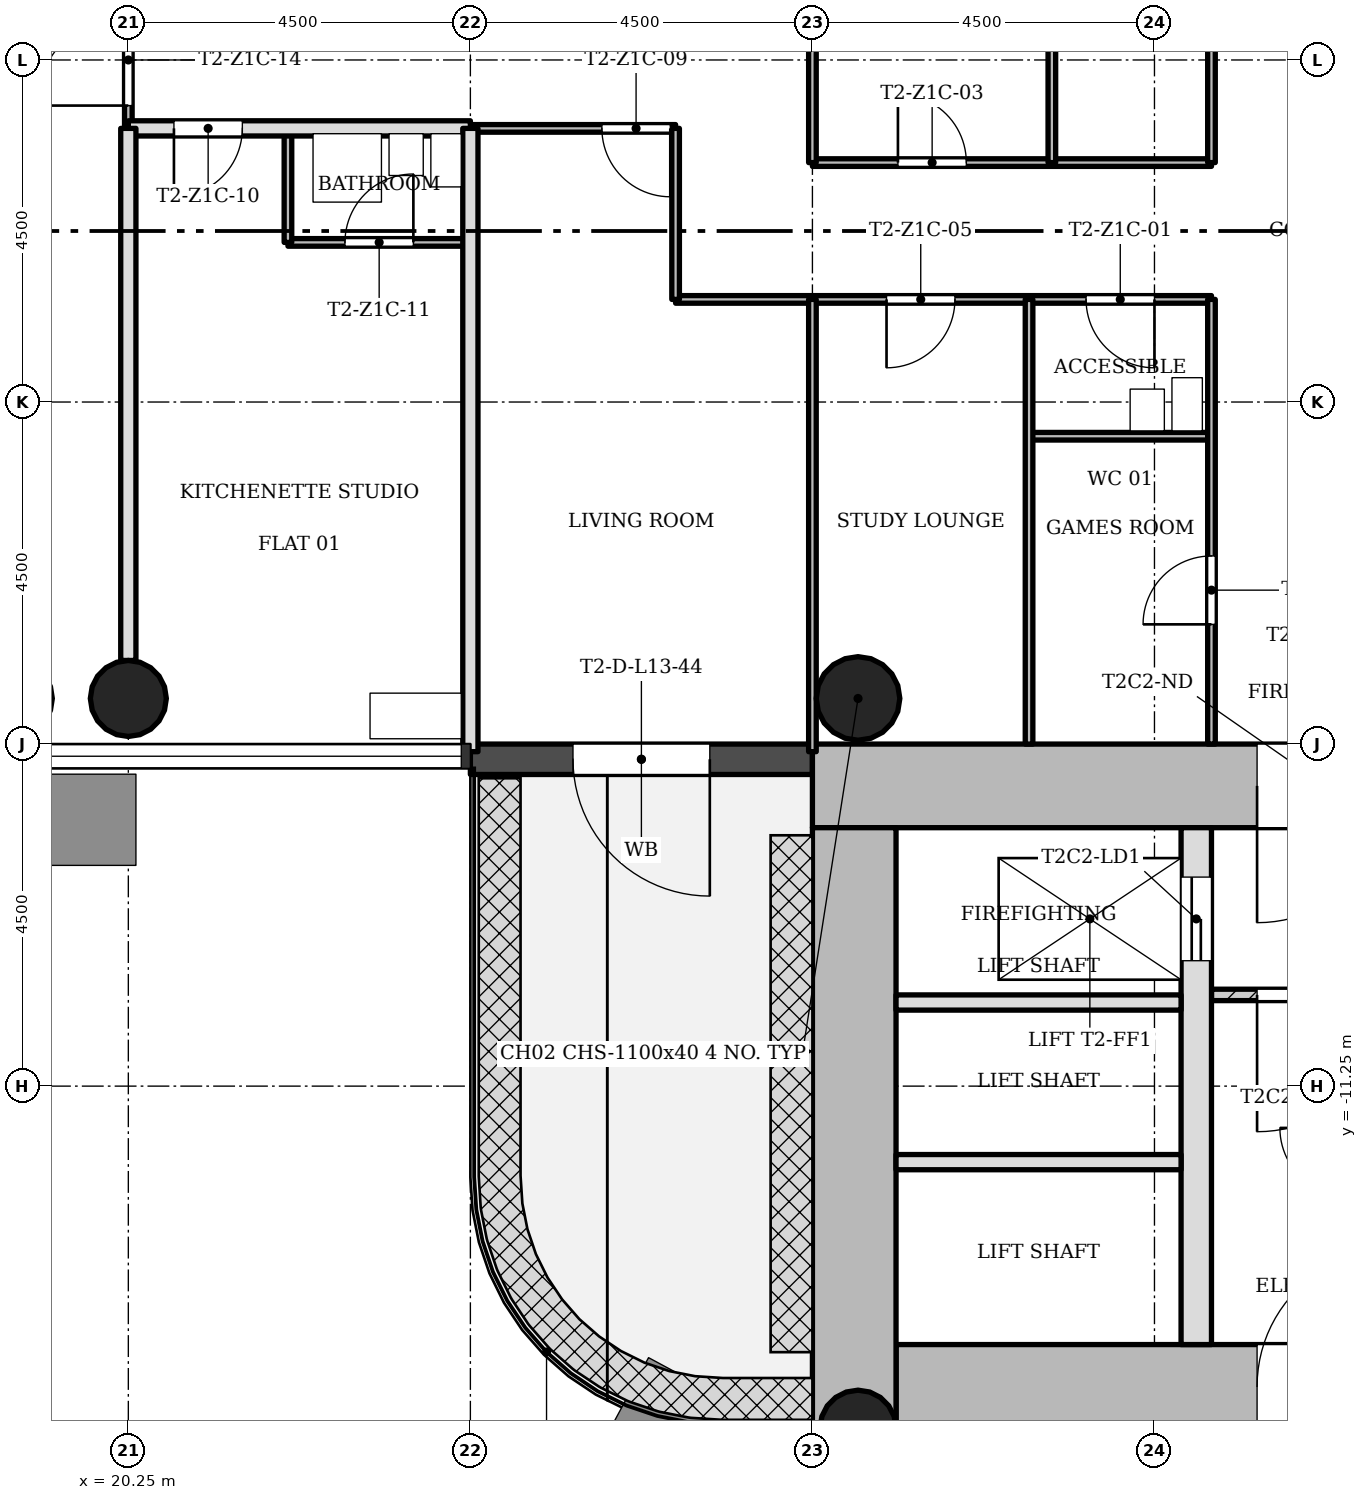
"""IFC4 building model, lengths in metres.
Left out: names, types, materials, properties, quantities, classifications, styles, units other than length and angle.
Written with IfcOpenShell. Run it as: python <this file> out.ifc"""

import sys

from ifc_helpers import new_model, si_unit, direction, frame, frame_2d, origin, origin_2d, place, context, subcontext, project, spatial, rectangle, hollow_circle, extrude, element, fill, save


model = new_model("IFC4")
c1 = context("Model", 3, precision=1e-05, world=origin(), true_north=direction((0.0, 1.0)))
c2 = subcontext(c1, "Body", "Model", "MODEL_VIEW")
j1 = project(units=[si_unit("LENGTHUNIT", "METRE"), si_unit("PLANEANGLEUNIT", "RADIAN")], contexts=[c1])
p1 = place(None, origin())
s1 = spatial("IfcSite", under=j1, at=p1, CompositionType="ELEMENT")
p2 = place(p1, origin())
s2 = spatial("IfcBuilding", under=s1, at=p2, CompositionType="ELEMENT")
p3 = place(p2, frame((0.0, 0.0, 51.7)))
s3 = spatial("IfcBuildingStorey", under=s2, at=p3, CompositionType="ELEMENT", Elevation=51.7)
p4 = place(p3, frame((30.35, -15.2, 0.0), z_axis=(0.0, 0.0, 1.0), x_axis=(1.0, 0.0, 0.0)))
e1 = element("IfcWall", 1, at=p4, inside=s3, PredefinedType="SHEAR", context=c2, shape_type="SweptSolid", body=[
    extrude(rectangle(XDim=12.4, YDim=1.1, at=frame_2d((6.2, 0.0))), origin(), (0.0, 0.0, 1.0), 3.4),
])
p5 = place(p4, frame((4.75, 0.0, 0.0)))
e2 = element("IfcOpeningElement", 2, at=p5, cuts=e1, PredefinedType="OPENING", context=c2, shape_type="SweptSolid", body=[
    extrude(rectangle(XDim=1.8, YDim=2.1, at=frame_2d((0.9, 1.05))), frame((0.0, 0.56, 0.0), z_axis=(0.0, -1.0, 0.0), x_axis=(1.0, 0.0, 0.0)), (0.0, 0.0, 1.0), 1.12),
])
p6 = place(p3, frame((41.65, -7.3, 0.0), z_axis=(0.0, 0.0, 1.0), x_axis=(-1.0, 0.0, 0.0)))
e3 = element("IfcWall", 3, at=p6, inside=s3, PredefinedType="SHEAR", context=c2, shape_type="SweptSolid", body=[
    extrude(rectangle(XDim=12.4, YDim=1.1, at=frame_2d((6.2, 0.0))), origin(), (0.0, 0.0, 1.0), 3.4),
])
p7 = place(p6, frame((4.75, 0.0, 0.0)))
e4 = element("IfcOpeningElement", 4, at=p7, cuts=e3, PredefinedType="OPENING", context=c2, shape_type="SweptSolid", body=[
    extrude(rectangle(XDim=1.8, YDim=2.1, at=frame_2d((0.9, 1.05))), frame((0.0, 0.56, 0.0), z_axis=(0.0, -1.0, 0.0), x_axis=(1.0, 0.0, 0.0)), (0.0, 0.0, 1.0), 1.12),
])
p8 = place(p3, frame((29.8, -7.85, 0.0), z_axis=(0.0, 0.0, 1.0), x_axis=(0.0, -1.0, 0.0)))
e5 = element("IfcWall", 5, at=p8, inside=s3, PredefinedType="SHEAR", context=c2, shape_type="SweptSolid", body=[
    extrude(rectangle(XDim=7.9, YDim=1.1, at=frame_2d((3.95, 0.0))), origin(), (0.0, 0.0, 1.0), 3.4),
])
p9 = place(p3, frame((34.3, -14.65, 0.0), z_axis=(0.0, 0.0, 1.0), x_axis=(0.0, 1.0, 0.0)))
e6 = element("IfcWall", 6, at=p9, inside=s3, PredefinedType="SHEAR", context=c2, shape_type="SweptSolid", body=[
    extrude(rectangle(XDim=6.8, YDim=0.4, at=frame_2d((3.4, 0.0))), origin(), (0.0, 0.0, 1.0), 3.4),
])
p10 = place(p9, frame((5.05, 0.0, 0.0)))
e7 = element("IfcOpeningElement", 7, at=p10, cuts=e6, PredefinedType="OPENING", context=c2, shape_type="SweptSolid", body=[
    extrude(rectangle(XDim=1.1, YDim=2.1, at=frame_2d((0.55, 1.05))), frame((0.0, 0.21, 0.0), z_axis=(0.0, -1.0, 0.0), x_axis=(1.0, 0.0, 0.0)), (0.0, 0.0, 1.0), 0.42),
])
for number, where, z_axis, x_axis in (
    (8, (20.25, -6.15, 0.0), (0.0, 0.0, 1.0), (1.0, 0.0, 0.0)),
    (9, (29.85, -15.75, 0.0), (0.0, 0.0, 1.0), (1.0, 0.0, 0.0)),
):
    element("IfcColumn", number, at=place(p3, frame(where, z_axis=z_axis, x_axis=x_axis)), inside=s3, PredefinedType="COLUMN", context=c2, shape_type="SweptSolid", body=[
        extrude(hollow_circle(Radius=0.5, WallThickness=0.036, at=origin_2d()), origin(), (0.0, 0.0, 1.0), 3.4),
    ])
p11 = place(p3, frame((29.85, -6.15, 0.0), z_axis=(0.0, 0.0, 1.0), x_axis=(1.0, 0.0, 0.0)))
e10 = element("IfcColumn", 10, at=p11, inside=s3, PredefinedType="COLUMN", context=c2, shape_type="SweptSolid", body=[
    extrude(hollow_circle(Radius=0.55, WallThickness=0.04, at=origin_2d()), origin(), (0.0, 0.0, 1.0), 3.4),
])
p12 = place(p3, frame((24.75, -6.95, -0.02), z_axis=(0.0, 0.0, 1.0), x_axis=(1.0, 0.0, 0.0)))
e11 = element("IfcWall", 11, at=p12, inside=s3, PredefinedType="STANDARD", context=c2, shape_type="SweptSolid", body=[
    extrude(rectangle(XDim=4.5, YDim=0.4, at=frame_2d((2.25, 0.0))), origin(), (0.0, 0.0, 1.0), 3.12),
])
p13 = place(p12, frame((1.35, 0.0, 0.02)))
e12 = element("IfcOpeningElement", 12, at=p13, cuts=e11, PredefinedType="OPENING", context=c2, shape_type="SweptSolid", body=[
    extrude(rectangle(XDim=1.8, YDim=2.1, at=frame_2d((0.9, 1.05))), frame((0.0, 0.21, 0.0), z_axis=(0.0, -1.0, 0.0), x_axis=(1.0, 0.0, 0.0)), (0.0, 0.0, 1.0), 0.42),
])
p14 = place(p3, frame((34.5, -10.05, 0.0), z_axis=(0.0, 0.0, 1.0), x_axis=(1.0, 0.0, 0.0)))
e13 = element("IfcWall", 13, at=p14, inside=s3, PredefinedType="PARTITIONING", context=c2, shape_type="SweptSolid", body=[
    extrude(rectangle(XDim=3.0, YDim=0.15, at=frame_2d((1.5, 0.0))), origin(), (0.0, 0.0, 1.0), 3.0),
])
p15 = place(p14, frame((0.6, 0.0, 0.0)))
e14 = element("IfcOpeningElement", 14, at=p15, cuts=e13, PredefinedType="OPENING", context=c2, shape_type="SweptSolid", body=[
    extrude(rectangle(XDim=1.8, YDim=2.1, at=frame_2d((0.9, 1.05))), frame((0.0, 0.085, 0.0), z_axis=(0.0, -1.0, 0.0), x_axis=(1.0, 0.0, 0.0)), (0.0, 0.0, 1.0), 0.17),
])
for number, where, z_axis, x_axis in (
    (15, (30.35, -10.15, 0.0), (0.0, 0.0, 1.0), (1.0, 0.0, 0.0)),
    (16, (30.35, -12.25, 0.0), (0.0, 0.0, 1.0), (1.0, 0.0, 0.0)),
):
    element("IfcWall", number, at=place(p3, frame(where, z_axis=z_axis, x_axis=x_axis)), inside=s3, PredefinedType="SOLIDWALL", context=c2, shape_type="SweptSolid", body=[
        extrude(rectangle(XDim=3.75, YDim=0.2, at=frame_2d((1.875, 0.0))), origin(), (0.0, 0.0, 1.0), 3.0),
    ])
p16 = place(p3, frame((34.5, -2.7, 0.0), z_axis=(0.0, 0.0, 1.0), x_axis=(-1.0, 0.0, 0.0)))
e17 = element("IfcWall", 17, at=p16, inside=s3, PredefinedType="PARTITIONING", context=c2, shape_type="SweptSolid", body=[
    extrude(rectangle(XDim=2.4, YDim=0.1, at=frame_2d((1.2, 0.0))), origin(), (0.0, 0.0, 1.0), 3.0),
])
p17 = place(p3, frame((34.5, -0.9, 0.0), z_axis=(0.0, 0.0, 1.0), x_axis=(-1.0, 0.0, 0.0)))
e18 = element("IfcWall", 18, at=p17, inside=s3, PredefinedType="PARTITIONING", context=c2, shape_type="SweptSolid", body=[
    extrude(rectangle(XDim=7.05, YDim=0.1, at=frame_2d((3.525, 0.0))), origin(), (0.0, 0.0, 1.0), 3.0),
])
p18 = place(p17, frame((0.75, 0.0, 0.0)))
e19 = element("IfcOpeningElement", 19, at=p18, cuts=e18, PredefinedType="OPENING", context=c2, shape_type="SweptSolid", body=[
    extrude(rectangle(XDim=0.9, YDim=2.1, at=frame_2d((0.45, 1.05))), frame((0.0, 0.06, 0.0), z_axis=(0.0, -1.0, 0.0), x_axis=(1.0, 0.0, 0.0)), (0.0, 0.0, 1.0), 0.12),
])
p19 = place(p17, frame((3.375, 0.0, 0.0)))
e20 = element("IfcOpeningElement", 20, at=p19, cuts=e18, PredefinedType="OPENING", context=c2, shape_type="SweptSolid", body=[
    extrude(rectangle(XDim=0.9, YDim=2.1, at=frame_2d((0.45, 1.05))), frame((0.0, 0.06, 0.0), z_axis=(0.0, -1.0, 0.0), x_axis=(1.0, 0.0, 0.0)), (0.0, 0.0, 1.0), 0.12),
])
p20 = place(p3, frame((24.75, -0.15, 0.0), z_axis=(0.0, 0.0, 1.0), x_axis=(-1.0, 0.0, 0.0)))
e21 = element("IfcWall", 21, at=p20, inside=s3, PredefinedType="PARTITIONING", context=c2, shape_type="SweptSolid", body=[
    extrude(rectangle(XDim=2.4, YDim=0.1, at=frame_2d((1.2, 0.0))), origin(), (0.0, 0.0, 1.0), 3.0),
])
p21 = place(p20, frame((0.75, 0.0, 0.0)))
e22 = element("IfcOpeningElement", 22, at=p21, cuts=e21, PredefinedType="OPENING", context=c2, shape_type="SweptSolid", body=[
    extrude(rectangle(XDim=0.9, YDim=2.1, at=frame_2d((0.45, 1.05))), frame((0.0, 0.06, 0.0), z_axis=(0.0, -1.0, 0.0), x_axis=(1.0, 0.0, 0.0)), (0.0, 0.0, 1.0), 0.12),
])
p22 = place(p3, frame((34.5, 0.9, 0.0), z_axis=(0.0, 0.0, 1.0), x_axis=(-1.0, 0.0, 0.0)))
e23 = element("IfcWall", 23, at=p22, inside=s3, PredefinedType="PARTITIONING", context=c2, shape_type="SweptSolid", body=[
    extrude(rectangle(XDim=5.25, YDim=0.1, at=frame_2d((2.625, 0.0))), origin(), (0.0, 0.0, 1.0), 3.0),
])
p23 = place(p22, frame((3.225, 0.0, 0.0)))
e24 = element("IfcOpeningElement", 24, at=p23, cuts=e23, PredefinedType="OPENING", context=c2, shape_type="SweptSolid", body=[
    extrude(rectangle(XDim=0.9, YDim=2.1, at=frame_2d((0.45, 1.05))), frame((0.0, 0.06, 0.0), z_axis=(0.0, -1.0, 0.0), x_axis=(1.0, 0.0, 0.0)), (0.0, 0.0, 1.0), 0.12),
])
p24 = place(p3, frame((27.45, 1.35, 0.0), z_axis=(0.0, 0.0, 1.0), x_axis=(-1.0, 0.0, 0.0)))
e25 = element("IfcWall", 25, at=p24, inside=s3, PredefinedType="PARTITIONING", context=c2, shape_type="SweptSolid", body=[
    extrude(rectangle(XDim=2.7, YDim=0.1, at=frame_2d((1.35, 0.0))), origin(), (0.0, 0.0, 1.0), 3.0),
])
p25 = place(p24, frame((0.07, 0.0, 0.0)))
e26 = element("IfcOpeningElement", 26, at=p25, cuts=e25, PredefinedType="OPENING", context=c2, shape_type="SweptSolid", body=[
    extrude(rectangle(XDim=0.9, YDim=2.1, at=frame_2d((0.45, 1.05))), frame((0.0, 0.06, 0.0), z_axis=(0.0, -1.0, 0.0), x_axis=(1.0, 0.0, 0.0)), (0.0, 0.0, 1.0), 0.12),
])
p26 = place(p3, frame((24.75, 1.35, 0.0), z_axis=(0.0, 0.0, 1.0), x_axis=(-1.0, 0.0, 0.0)))
e27 = element("IfcWall", 27, at=p26, inside=s3, PredefinedType="SOLIDWALL", context=c2, shape_type="SweptSolid", body=[
    extrude(rectangle(XDim=4.5, YDim=0.2, at=frame_2d((2.25, 0.0))), origin(), (0.0, 0.0, 1.0), 3.0),
])
p27 = place(p26, frame((3.0, 0.0, 0.0)))
e28 = element("IfcOpeningElement", 28, at=p27, cuts=e27, PredefinedType="OPENING", context=c2, shape_type="SweptSolid", body=[
    extrude(rectangle(XDim=0.9, YDim=2.1, at=frame_2d((0.45, 1.05))), frame((0.0, 0.11, 0.0), z_axis=(0.0, -1.0, 0.0), x_axis=(1.0, 0.0, 0.0)), (0.0, 0.0, 1.0), 0.22),
])
p28 = place(p3, frame((34.5, -6.75, 0.0), z_axis=(0.0, 0.0, 1.0), x_axis=(0.0, 1.0, 0.0)))
e29 = element("IfcWall", 29, at=p28, inside=s3, PredefinedType="PARTITIONING", context=c2, shape_type="SweptSolid", body=[
    extrude(rectangle(XDim=5.85, YDim=0.1, at=frame_2d((2.925, 0.0))), origin(), (0.0, 0.0, 1.0), 3.0),
])
p29 = place(p28, frame((1.575, 0.0, 0.0)))
e30 = element("IfcOpeningElement", 30, at=p29, cuts=e29, PredefinedType="OPENING", context=c2, shape_type="SweptSolid", body=[
    extrude(rectangle(XDim=0.9, YDim=2.1, at=frame_2d((0.45, 1.05))), frame((0.0, 0.06, 0.0), z_axis=(0.0, -1.0, 0.0), x_axis=(1.0, 0.0, 0.0)), (0.0, 0.0, 1.0), 0.12),
])
p30 = place(p3, frame((34.5, 0.9, 0.0), z_axis=(0.0, 0.0, 1.0), x_axis=(0.0, 1.0, 0.0)))
e31 = element("IfcWall", 31, at=p30, inside=s3, PredefinedType="PARTITIONING", context=c2, shape_type="SweptSolid", body=[
    extrude(rectangle(XDim=5.85, YDim=0.1, at=frame_2d((2.925, 0.0))), origin(), (0.0, 0.0, 1.0), 3.0),
])
p31 = place(p30, frame((2.475, 0.0, 0.0)))
e32 = element("IfcOpeningElement", 32, at=p31, cuts=e31, PredefinedType="OPENING", context=c2, shape_type="SweptSolid", body=[
    extrude(rectangle(XDim=0.9, YDim=2.1, at=frame_2d((0.45, 1.05))), frame((0.0, 0.06, 0.0), z_axis=(0.0, -1.0, 0.0), x_axis=(1.0, 0.0, 0.0)), (0.0, 0.0, 1.0), 0.12),
])
for number, where, z_axis, x_axis in (
    (33, (32.4, 0.9, 0.0), (0.0, 0.0, 1.0), (0.0, 1.0, 0.0)),
    (34, (32.1, -6.75, 0.0), (0.0, 0.0, 1.0), (0.0, 1.0, 0.0)),
):
    element("IfcWall", number, at=place(p3, frame(where, z_axis=z_axis, x_axis=x_axis)), inside=s3, PredefinedType="PARTITIONING", context=c2, shape_type="SweptSolid", body=[
        extrude(rectangle(XDim=5.85, YDim=0.1, at=frame_2d((2.925, 0.0))), origin(), (0.0, 0.0, 1.0), 3.0),
    ])
for number, where, z_axis, x_axis in (
    (35, (29.25, -6.85, 0.0), (0.0, 0.0, 1.0), (0.0, 1.0, 0.0)),
    (36, (29.25, 0.9, 0.0), (0.0, 0.0, 1.0), (0.0, 1.0, 0.0)),
):
    element("IfcWall", number, at=place(p3, frame(where, z_axis=z_axis, x_axis=x_axis)), inside=s3, PredefinedType="PARTITIONING", context=c2, shape_type="SweptSolid", body=[
        extrude(rectangle(XDim=5.95, YDim=0.1, at=frame_2d((2.975, 0.0))), origin(), (0.0, 0.0, 1.0), 3.0),
    ])
p32 = place(p3, frame((27.45, -0.9, 0.0), z_axis=(0.0, 0.0, 1.0), x_axis=(0.0, 1.0, 0.0)))
e37 = element("IfcWall", 37, at=p32, inside=s3, PredefinedType="PARTITIONING", context=c2, shape_type="SweptSolid", body=[
    extrude(rectangle(XDim=2.25, YDim=0.1, at=frame_2d((1.125, 0.0))), origin(), (0.0, 0.0, 1.0), 3.0),
])
p33 = place(p3, frame((24.75, -6.85, 0.0), z_axis=(0.0, 0.0, 1.0), x_axis=(0.0, 1.0, 0.0)))
e38 = element("IfcWall", 38, at=p33, inside=s3, PredefinedType="SOLIDWALL", context=c2, shape_type="SweptSolid", body=[
    extrude(rectangle(XDim=8.2, YDim=0.2, at=frame_2d((4.1, 0.0))), origin(), (0.0, 0.0, 1.0), 3.0),
])
p34 = place(p3, frame((22.35, -0.15, 0.0), z_axis=(0.0, 0.0, 1.0), x_axis=(0.0, 1.0, 0.0)))
e39 = element("IfcWall", 39, at=p34, inside=s3, PredefinedType="PARTITIONING", context=c2, shape_type="SweptSolid", body=[
    extrude(rectangle(XDim=1.5, YDim=0.1, at=frame_2d((0.75, 0.0))), origin(), (0.0, 0.0, 1.0), 3.0),
])
p35 = place(p3, frame((20.25, 1.35, 0.0), z_axis=(0.0, 0.0, 1.0), x_axis=(0.0, 1.0, 0.0)))
e40 = element("IfcWall", 40, at=p35, inside=s3, PredefinedType="PARTITIONING", context=c2, shape_type="SweptSolid", body=[
    extrude(rectangle(XDim=4.3, YDim=0.1, at=frame_2d((2.15, 0.0))), origin(), (0.0, 0.0, 1.0), 3.0),
])
p36 = place(p35, frame((0.3, 0.0, 0.0)))
e41 = element("IfcOpeningElement", 41, at=p36, cuts=e40, PredefinedType="OPENING", context=c2, shape_type="SweptSolid", body=[
    extrude(rectangle(XDim=1.2, YDim=2.1, at=frame_2d((0.6, 1.05))), frame((0.0, 0.06, 0.0), z_axis=(0.0, -1.0, 0.0), x_axis=(1.0, 0.0, 0.0)), (0.0, 0.0, 1.0), 0.12),
])
p37 = place(p3, frame((20.25, -5.65, 0.0), z_axis=(0.0, 0.0, 1.0), x_axis=(0.0, 1.0, 0.0)))
e42 = element("IfcWall", 42, at=p37, inside=s3, PredefinedType="SOLIDWALL", context=c2, shape_type="SweptSolid", body=[
    extrude(rectangle(XDim=7.0, YDim=0.2, at=frame_2d((3.5, 0.0))), origin(), (0.0, 0.0, 1.0), 3.0),
])
p38 = place(p13, origin())
e43 = element("IfcDoor", 43, at=p38, inside=s3, OperationType="SINGLE_SWING_RIGHT", PredefinedType="DOOR", context=c2, shape_type="SweptSolid", body=[
    extrude(rectangle(XDim=1.8, YDim=2.1, at=frame_2d((0.9, 1.05))), frame((0.0, 0.025, 0.0), z_axis=(0.0, -1.0, 0.0), x_axis=(1.0, 0.0, 0.0)), (0.0, 0.0, 1.0), 0.05),
])
fill(e12, e43)
p39 = place(p15, origin())
e44 = element("IfcDoor", 44, at=p39, inside=s3, OperationType="SINGLE_SWING_LEFT", PredefinedType="DOOR", context=c2, shape_type="SweptSolid", body=[
    extrude(rectangle(XDim=1.8, YDim=2.1, at=frame_2d((0.9, 1.05))), frame((0.0, 0.025, 0.0), z_axis=(0.0, -1.0, 0.0), x_axis=(1.0, 0.0, 0.0)), (0.0, 0.0, 1.0), 0.05),
])
fill(e14, e44)
p40 = place(p18, origin())
e45 = element("IfcDoor", 45, at=p40, inside=s3, OperationType="SINGLE_SWING_RIGHT", PredefinedType="DOOR", context=c2, shape_type="SweptSolid", body=[
    extrude(rectangle(XDim=0.9, YDim=2.1, at=frame_2d((0.45, 1.05))), frame((0.0, 0.025, 0.0), z_axis=(0.0, -1.0, 0.0), x_axis=(1.0, 0.0, 0.0)), (0.0, 0.0, 1.0), 0.05),
])
fill(e19, e45)
p41 = place(p23, origin())
e46 = element("IfcDoor", 46, at=p41, inside=s3, OperationType="SINGLE_SWING_RIGHT", PredefinedType="DOOR", context=c2, shape_type="SweptSolid", body=[
    extrude(rectangle(XDim=0.9, YDim=2.1, at=frame_2d((0.45, 1.05))), frame((0.0, 0.025, 0.0), z_axis=(0.0, -1.0, 0.0), x_axis=(1.0, 0.0, 0.0)), (0.0, 0.0, 1.0), 0.05),
])
fill(e24, e46)
p42 = place(p29, origin())
e47 = element("IfcDoor", 47, at=p42, inside=s3, OperationType="SINGLE_SWING_RIGHT", PredefinedType="DOOR", context=c2, shape_type="SweptSolid", body=[
    extrude(rectangle(XDim=0.9, YDim=2.1, at=frame_2d((0.45, 1.05))), frame((0.0, 0.025, 0.0), z_axis=(0.0, -1.0, 0.0), x_axis=(1.0, 0.0, 0.0)), (0.0, 0.0, 1.0), 0.05),
])
fill(e30, e47)
p43 = place(p19, origin())
e48 = element("IfcDoor", 48, at=p43, inside=s3, OperationType="SINGLE_SWING_LEFT", PredefinedType="DOOR", context=c2, shape_type="SweptSolid", body=[
    extrude(rectangle(XDim=0.9, YDim=2.1, at=frame_2d((0.45, 1.05))), frame((0.0, 0.025, 0.0), z_axis=(0.0, -1.0, 0.0), x_axis=(1.0, 0.0, 0.0)), (0.0, 0.0, 1.0), 0.05),
])
fill(e20, e48)
p44 = place(p25, origin())
e49 = element("IfcDoor", 49, at=p44, inside=s3, OperationType="SINGLE_SWING_RIGHT", PredefinedType="DOOR", context=c2, shape_type="SweptSolid", body=[
    extrude(rectangle(XDim=0.9, YDim=2.1, at=frame_2d((0.45, 1.05))), frame((0.0, 0.025, 0.0), z_axis=(0.0, -1.0, 0.0), x_axis=(1.0, 0.0, 0.0)), (0.0, 0.0, 1.0), 0.05),
])
fill(e26, e49)
p45 = place(p27, origin())
e50 = element("IfcDoor", 50, at=p45, inside=s3, OperationType="SINGLE_SWING_LEFT", PredefinedType="DOOR", context=c2, shape_type="SweptSolid", body=[
    extrude(rectangle(XDim=0.9, YDim=2.1, at=frame_2d((0.45, 1.05))), frame((0.0, 0.025, 0.0), z_axis=(0.0, -1.0, 0.0), x_axis=(1.0, 0.0, 0.0)), (0.0, 0.0, 1.0), 0.05),
])
fill(e28, e50)
p46 = place(p21, origin())
e51 = element("IfcDoor", 51, at=p46, inside=s3, OperationType="SINGLE_SWING_LEFT", PredefinedType="DOOR", context=c2, shape_type="SweptSolid", body=[
    extrude(rectangle(XDim=0.9, YDim=2.1, at=frame_2d((0.45, 1.05))), frame((0.0, 0.025, 0.0), z_axis=(0.0, -1.0, 0.0), x_axis=(1.0, 0.0, 0.0)), (0.0, 0.0, 1.0), 0.05),
])
fill(e22, e51)
p47 = place(p36, origin())
e52 = element("IfcDoor", 52, at=p47, inside=s3, OperationType="SINGLE_SWING_RIGHT", PredefinedType="DOOR", context=c2, shape_type="SweptSolid", body=[
    extrude(rectangle(XDim=1.2, YDim=2.1, at=frame_2d((0.6, 1.05))), frame((0.0, 0.025, 0.0), z_axis=(0.0, -1.0, 0.0), x_axis=(1.0, 0.0, 0.0)), (0.0, 0.0, 1.0), 0.05),
])
fill(e41, e52)
p48 = place(p10, origin())
e53 = element("IfcDoor", 53, at=p48, inside=s3, OperationType="SLIDING_TO_LEFT", PredefinedType="DOOR", context=c2, shape_type="SweptSolid", body=[
    extrude(rectangle(XDim=1.1, YDim=2.1, at=frame_2d((0.55, 1.05))), frame((0.0, 0.025, 0.0), z_axis=(0.0, -1.0, 0.0), x_axis=(1.0, 0.0, 0.0)), (0.0, 0.0, 1.0), 0.05),
])
fill(e7, e53)
p49 = place(p7, origin())
e54 = element("IfcDoor", 54, at=p49, inside=s3, OperationType="SINGLE_SWING_LEFT", PredefinedType="DOOR", context=c2, shape_type="SweptSolid", body=[
    extrude(rectangle(XDim=1.8, YDim=2.1, at=frame_2d((0.9, 1.05))), frame((0.0, 0.025, 0.0), z_axis=(0.0, -1.0, 0.0), x_axis=(1.0, 0.0, 0.0)), (0.0, 0.0, 1.0), 0.05),
])
fill(e4, e54)
p50 = place(p5, origin())
e55 = element("IfcDoor", 55, at=p50, inside=s3, OperationType="SINGLE_SWING_LEFT", PredefinedType="DOOR", context=c2, shape_type="SweptSolid", body=[
    extrude(rectangle(XDim=1.8, YDim=2.1, at=frame_2d((0.9, 1.05))), frame((0.0, 0.025, 0.0), z_axis=(0.0, -1.0, 0.0), x_axis=(1.0, 0.0, 0.0)), (0.0, 0.0, 1.0), 0.05),
])
fill(e2, e55)
save(model, sys.argv[1])
